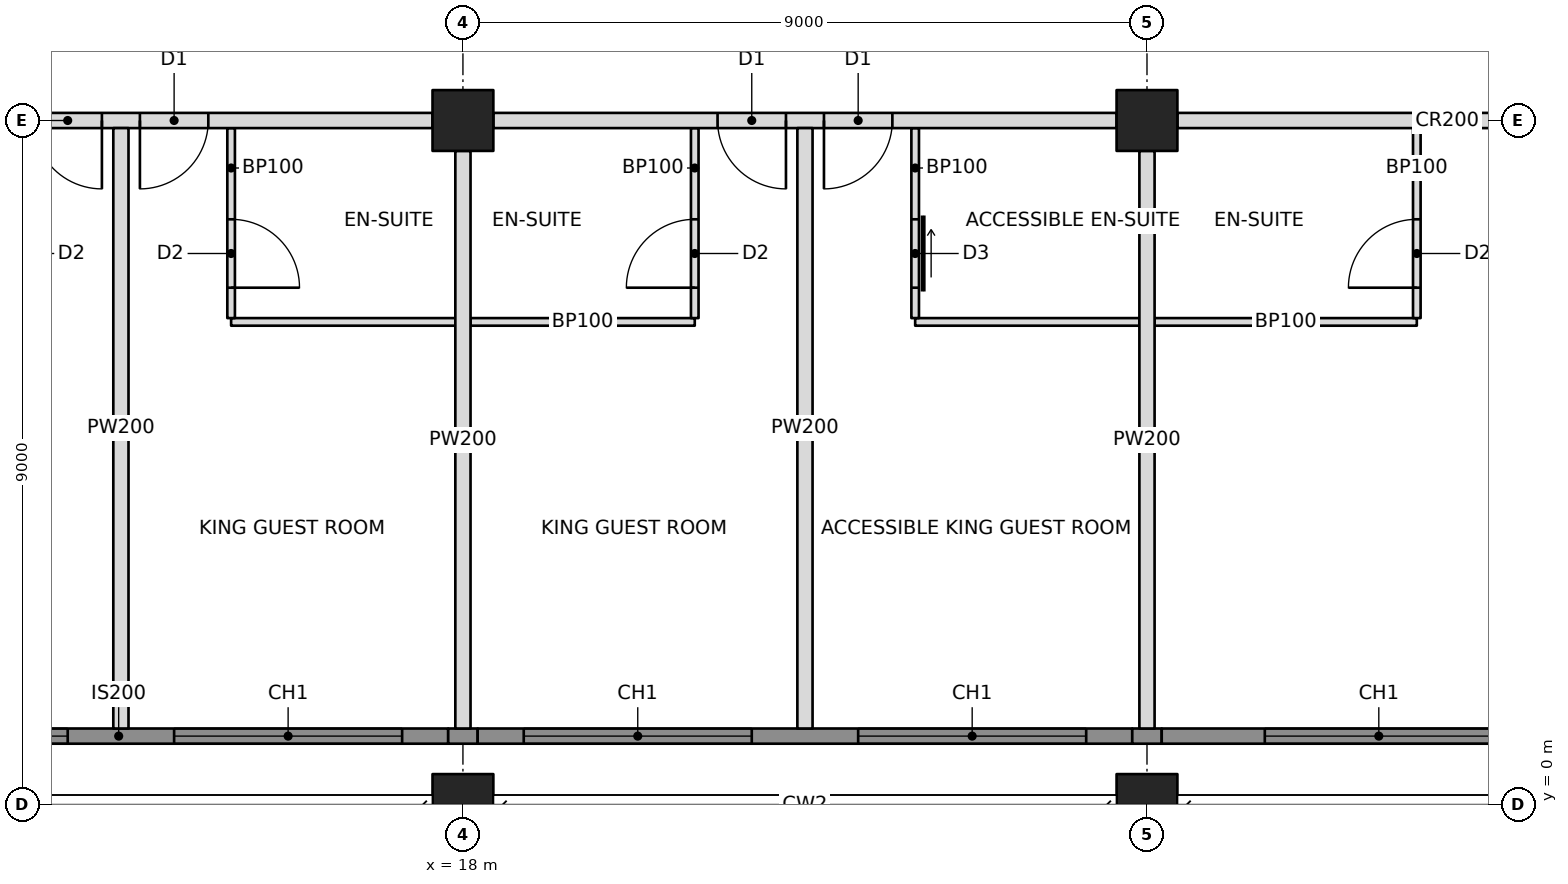
"""IFC4 building model, lengths in metres.
Left out: names, types, materials, properties, quantities, classifications, styles, units other than length and angle.
Written with IfcOpenShell. Run it as: python <this file> out.ifc"""

import sys

from ifc_helpers import new_model, si_unit, direction, frame, frame_2d, origin, origin_2d, place, context, subcontext, project, spatial, rectangle, hollow_rectangle, extrude, element, fill, save


model = new_model("IFC4")
c1 = context("Model", 3, precision=1e-05, world=origin(), true_north=direction((0.0, 1.0)))
c2 = subcontext(c1, "Body", "Model", "MODEL_VIEW")
j1 = project(units=[si_unit("LENGTHUNIT", "METRE"), si_unit("PLANEANGLEUNIT", "RADIAN")], contexts=[c1])
p1 = place(None, origin())
s1 = spatial("IfcSite", under=j1, at=p1, CompositionType="ELEMENT")
p2 = place(p1, origin())
s2 = spatial("IfcBuilding", under=s1, at=p2, CompositionType="ELEMENT")
p3 = place(p2, frame((0.0, 0.0, 251.8)))
s3 = spatial("IfcBuildingStorey", under=s2, at=p3, CompositionType="ELEMENT", Elevation=251.8)
for number, where, z_axis, x_axis in (
    (1, (18.0, 0.0, 0.0), (0.0, 0.0, 1.0), (1.0, 0.0, 0.0)),
    (2, (18.0, 9.0, 0.0), (0.0, 0.0, 1.0), (1.0, 0.0, 0.0)),
    (3, (27.0, 0.0, 0.0), (0.0, 0.0, 1.0), (1.0, 0.0, 0.0)),
    (4, (27.0, 9.0, 0.0), (0.0, 0.0, 1.0), (1.0, 0.0, 0.0)),
):
    element("IfcColumn", number, at=place(p3, frame(where, z_axis=z_axis, x_axis=x_axis)), inside=s3, PredefinedType="COLUMN", context=c2, shape_type="SweptSolid", body=[
        extrude(hollow_rectangle(XDim=0.8, YDim=0.8, WallThickness=0.032, at=origin_2d()), origin(), (0.0, 0.0, 1.0), 3.6),
    ])
p4 = place(p3, frame((9.4, 9.0, 0.0), z_axis=(0.0, 0.0, 1.0), x_axis=(1.0, 0.0, 0.0)))
e5 = element("IfcWall", 5, at=p4, inside=s3, PredefinedType="PARTITIONING", context=c2, shape_type="SweptSolid", body=[
    extrude(rectangle(XDim=8.2, YDim=0.2, at=frame_2d((4.1, 0.0))), origin(), (0.0, 0.0, 1.0), 2.605),
])
p5 = place(p4, frame((2.95, 0.0, 0.0)))
e6 = element("IfcOpeningElement", 6, at=p5, cuts=e5, PredefinedType="OPENING", context=c2, shape_type="SweptSolid", body=[
    extrude(rectangle(XDim=0.9, YDim=2.1, at=frame_2d((0.45, 1.05))), frame((0.0, 0.11, 0.0), z_axis=(0.0, -1.0, 0.0), x_axis=(1.0, 0.0, 0.0)), (0.0, 0.0, 1.0), 0.22),
])
p6 = place(p4, frame((4.35, 0.0, 0.0)))
e7 = element("IfcOpeningElement", 7, at=p6, cuts=e5, PredefinedType="OPENING", context=c2, shape_type="SweptSolid", body=[
    extrude(rectangle(XDim=0.9, YDim=2.1, at=frame_2d((0.45, 1.05))), frame((0.0, 0.11, 0.0), z_axis=(0.0, -1.0, 0.0), x_axis=(1.0, 0.0, 0.0)), (0.0, 0.0, 1.0), 0.22),
])
p7 = place(p3, frame((18.4, 9.0, 0.0), z_axis=(0.0, 0.0, 1.0), x_axis=(1.0, 0.0, 0.0)))
e8 = element("IfcWall", 8, at=p7, inside=s3, PredefinedType="PARTITIONING", context=c2, shape_type="SweptSolid", body=[
    extrude(rectangle(XDim=8.2, YDim=0.2, at=frame_2d((4.1, 0.0))), origin(), (0.0, 0.0, 1.0), 2.605),
])
p8 = place(p7, frame((2.95, 0.0, 0.0)))
e9 = element("IfcOpeningElement", 9, at=p8, cuts=e8, PredefinedType="OPENING", context=c2, shape_type="SweptSolid", body=[
    extrude(rectangle(XDim=0.9, YDim=2.1, at=frame_2d((0.45, 1.05))), frame((0.0, 0.11, 0.0), z_axis=(0.0, -1.0, 0.0), x_axis=(1.0, 0.0, 0.0)), (0.0, 0.0, 1.0), 0.22),
])
p9 = place(p7, frame((4.35, 0.0, 0.0)))
e10 = element("IfcOpeningElement", 10, at=p9, cuts=e8, PredefinedType="OPENING", context=c2, shape_type="SweptSolid", body=[
    extrude(rectangle(XDim=0.9, YDim=2.1, at=frame_2d((0.45, 1.05))), frame((0.0, 0.11, 0.0), z_axis=(0.0, -1.0, 0.0), x_axis=(1.0, 0.0, 0.0)), (0.0, 0.0, 1.0), 0.22),
])
p10 = place(p3, frame((27.4, 9.0, 0.0), z_axis=(0.0, 0.0, 1.0), x_axis=(1.0, 0.0, 0.0)))
e11 = element("IfcWall", 11, at=p10, inside=s3, PredefinedType="PARTITIONING", context=c2, shape_type="SweptSolid", body=[
    extrude(rectangle(XDim=8.378, YDim=0.2, at=frame_2d((4.189, 0.0))), origin(), (0.0, 0.0, 1.0), 2.605),
])
p11 = place(p10, frame((7.25, 0.0, 0.0)))
e12 = element("IfcOpeningElement", 12, at=p11, cuts=e11, PredefinedType="OPENING", context=c2, shape_type="SweptSolid", body=[
    extrude(rectangle(XDim=0.9, YDim=2.1, at=frame_2d((0.45, 1.05))), frame((0.0, 0.11, 0.0), z_axis=(0.0, -1.0, 0.0), x_axis=(1.0, 0.0, 0.0)), (0.0, 0.0, 1.0), 0.22),
])
p12 = place(p3, frame((13.5, 8.9, 0.0), z_axis=(0.0, 0.0, 1.0), x_axis=(0.0, -1.0, 0.0)))
e13 = element("IfcWall", 13, at=p12, inside=s3, PredefinedType="PARTITIONING", context=c2, shape_type="SweptSolid", body=[
    extrude(rectangle(XDim=7.9, YDim=0.2, at=frame_2d((3.95, 0.0))), origin(), (0.0, 0.0, 1.0), 2.604),
])
p13 = place(p3, frame((18.0, 8.6, 0.0), z_axis=(0.0, 0.0, 1.0), x_axis=(0.0, -1.0, 0.0)))
e14 = element("IfcWall", 14, at=p13, inside=s3, PredefinedType="PARTITIONING", context=c2, shape_type="SweptSolid", body=[
    extrude(rectangle(XDim=7.6, YDim=0.2, at=frame_2d((3.8, 0.0))), origin(), (0.0, 0.0, 1.0), 2.605),
])
p14 = place(p3, frame((22.5, 8.9, 0.0), z_axis=(0.0, 0.0, 1.0), x_axis=(0.0, -1.0, 0.0)))
e15 = element("IfcWall", 15, at=p14, inside=s3, PredefinedType="PARTITIONING", context=c2, shape_type="SweptSolid", body=[
    extrude(rectangle(XDim=7.9, YDim=0.2, at=frame_2d((3.95, 0.0))), origin(), (0.0, 0.0, 1.0), 2.604),
])
p15 = place(p3, frame((27.0, 8.6, 0.0), z_axis=(0.0, 0.0, 1.0), x_axis=(0.0, -1.0, 0.0)))
e16 = element("IfcWall", 16, at=p15, inside=s3, PredefinedType="PARTITIONING", context=c2, shape_type="SweptSolid", body=[
    extrude(rectangle(XDim=7.6, YDim=0.2, at=frame_2d((3.8, 0.0))), origin(), (0.0, 0.0, 1.0), 2.605),
])
p16 = place(p3, frame((14.95, 6.35, 0.0), z_axis=(0.0, 0.0, 1.0), x_axis=(1.0, 0.0, 0.0)))
e17 = element("IfcWall", 17, at=p16, inside=s3, PredefinedType="PARTITIONING", context=c2, shape_type="SweptSolid", body=[
    extrude(rectangle(XDim=2.95, YDim=0.1, at=frame_2d((1.475, 0.0))), origin(), (0.0, 0.0, 1.0), 2.604),
])
p17 = place(p3, frame((14.95, 8.9, 0.0), z_axis=(0.0, 0.0, 1.0), x_axis=(0.0, -1.0, 0.0)))
e18 = element("IfcWall", 18, at=p17, inside=s3, PredefinedType="PARTITIONING", context=c2, shape_type="SweptSolid", body=[
    extrude(rectangle(XDim=2.5, YDim=0.1, at=frame_2d((1.25, 0.0))), origin(), (0.0, 0.0, 1.0), 2.604),
])
p18 = place(p17, frame((1.2, 0.0, 0.0)))
e19 = element("IfcOpeningElement", 19, at=p18, cuts=e18, PredefinedType="OPENING", context=c2, shape_type="SweptSolid", body=[
    extrude(rectangle(XDim=0.9, YDim=2.1, at=frame_2d((0.45, 1.05))), frame((0.0, 0.06, 0.0), z_axis=(0.0, -1.0, 0.0), x_axis=(1.0, 0.0, 0.0)), (0.0, 0.0, 1.0), 0.12),
])
p19 = place(p3, frame((18.1, 6.35, 0.0), z_axis=(0.0, 0.0, 1.0), x_axis=(1.0, 0.0, 0.0)))
e20 = element("IfcWall", 20, at=p19, inside=s3, PredefinedType="PARTITIONING", context=c2, shape_type="SweptSolid", body=[
    extrude(rectangle(XDim=2.95, YDim=0.1, at=frame_2d((1.475, 0.0))), origin(), (0.0, 0.0, 1.0), 2.604),
])
p20 = place(p3, frame((21.05, 8.9, 0.0), z_axis=(0.0, 0.0, 1.0), x_axis=(0.0, -1.0, 0.0)))
e21 = element("IfcWall", 21, at=p20, inside=s3, PredefinedType="PARTITIONING", context=c2, shape_type="SweptSolid", body=[
    extrude(rectangle(XDim=2.5, YDim=0.1, at=frame_2d((1.25, 0.0))), origin(), (0.0, 0.0, 1.0), 2.604),
])
p21 = place(p20, frame((1.2, 0.0, 0.0)))
e22 = element("IfcOpeningElement", 22, at=p21, cuts=e21, PredefinedType="OPENING", context=c2, shape_type="SweptSolid", body=[
    extrude(rectangle(XDim=0.9, YDim=2.1, at=frame_2d((0.45, 1.05))), frame((0.0, 0.06, 0.0), z_axis=(0.0, -1.0, 0.0), x_axis=(1.0, 0.0, 0.0)), (0.0, 0.0, 1.0), 0.12),
])
p22 = place(p3, frame((23.95, 6.35, 0.0), z_axis=(0.0, 0.0, 1.0), x_axis=(1.0, 0.0, 0.0)))
e23 = element("IfcWall", 23, at=p22, inside=s3, PredefinedType="PARTITIONING", context=c2, shape_type="SweptSolid", body=[
    extrude(rectangle(XDim=2.95, YDim=0.1, at=frame_2d((1.475, 0.0))), origin(), (0.0, 0.0, 1.0), 2.604),
])
p23 = place(p3, frame((23.95, 8.9, 0.0), z_axis=(0.0, 0.0, 1.0), x_axis=(0.0, -1.0, 0.0)))
e24 = element("IfcWall", 24, at=p23, inside=s3, PredefinedType="PARTITIONING", context=c2, shape_type="SweptSolid", body=[
    extrude(rectangle(XDim=2.5, YDim=0.1, at=frame_2d((1.25, 0.0))), origin(), (0.0, 0.0, 1.0), 2.604),
])
p24 = place(p23, frame((1.2, 0.0, 0.0)))
e25 = element("IfcOpeningElement", 25, at=p24, cuts=e24, PredefinedType="OPENING", context=c2, shape_type="SweptSolid", body=[
    extrude(rectangle(XDim=0.9, YDim=2.1, at=frame_2d((0.45, 1.05))), frame((0.0, 0.06, 0.0), z_axis=(0.0, -1.0, 0.0), x_axis=(1.0, 0.0, 0.0)), (0.0, 0.0, 1.0), 0.12),
])
p25 = place(p3, frame((27.1, 6.35, 0.0), z_axis=(0.0, 0.0, 1.0), x_axis=(1.0, 0.0, 0.0)))
e26 = element("IfcWall", 26, at=p25, inside=s3, PredefinedType="PARTITIONING", context=c2, shape_type="SweptSolid", body=[
    extrude(rectangle(XDim=3.45, YDim=0.1, at=frame_2d((1.725, 0.0))), origin(), (0.0, 0.0, 1.0), 2.604),
])
p26 = place(p3, frame((30.55, 8.9, 0.0), z_axis=(0.0, 0.0, 1.0), x_axis=(0.0, -1.0, 0.0)))
e27 = element("IfcWall", 27, at=p26, inside=s3, PredefinedType="PARTITIONING", context=c2, shape_type="SweptSolid", body=[
    extrude(rectangle(XDim=2.5, YDim=0.1, at=frame_2d((1.25, 0.0))), origin(), (0.0, 0.0, 1.0), 2.604),
])
p27 = place(p26, frame((1.2, 0.0, 0.0)))
e28 = element("IfcOpeningElement", 28, at=p27, cuts=e27, PredefinedType="OPENING", context=c2, shape_type="SweptSolid", body=[
    extrude(rectangle(XDim=0.9, YDim=2.1, at=frame_2d((0.45, 1.05))), frame((0.0, 0.06, 0.0), z_axis=(0.0, -1.0, 0.0), x_axis=(1.0, 0.0, 0.0)), (0.0, 0.0, 1.0), 0.12),
])
p28 = place(p3, frame((9.135, 0.9, 0.0), z_axis=(0.0, 0.0, 1.0), x_axis=(1.0, 0.0, 0.0)))
e29 = element("IfcWall", 29, at=p28, inside=s3, PredefinedType="SOLIDWALL", context=c2, shape_type="SweptSolid", body=[
    extrude(rectangle(XDim=8.671, YDim=0.2, at=frame_2d((4.335, 0.0))), origin(), (0.0, 0.0, 1.0), 3.4),
])
p29 = place(p28, frame((0.665, 0.0, 0.6)))
e30 = element("IfcOpeningElement", 30, at=p29, cuts=e29, PredefinedType="OPENING", context=c2, shape_type="SweptSolid", body=[
    extrude(rectangle(XDim=3.0, YDim=2.2, at=frame_2d((1.5, 1.1))), frame((0.0, 0.11, 0.0), z_axis=(0.0, -1.0, 0.0), x_axis=(1.0, 0.0, 0.0)), (0.0, 0.0, 1.0), 0.22),
])
p30 = place(p28, frame((5.065, 0.0, 0.6)))
e31 = element("IfcOpeningElement", 31, at=p30, cuts=e29, PredefinedType="OPENING", context=c2, shape_type="SweptSolid", body=[
    extrude(rectangle(XDim=3.0, YDim=2.2, at=frame_2d((1.5, 1.1))), frame((0.0, 0.11, 0.0), z_axis=(0.0, -1.0, 0.0), x_axis=(1.0, 0.0, 0.0)), (0.0, 0.0, 1.0), 0.22),
])
p31 = place(p3, frame((17.806, 0.9, 0.0), z_axis=(0.0, 0.0, 1.0), x_axis=(1.0, 0.0, 0.0)))
e32 = element("IfcWall", 32, at=p31, inside=s3, PredefinedType="SOLIDWALL", context=c2, shape_type="SweptSolid", body=[
    extrude(rectangle(XDim=0.388, YDim=0.2, at=frame_2d((0.194, 0.0))), origin(), (0.0, 0.0, 1.0), 2.604),
])
p32 = place(p3, frame((18.194, 0.9, 0.0), z_axis=(0.0, 0.0, 1.0), x_axis=(1.0, 0.0, 0.0)))
e33 = element("IfcWall", 33, at=p32, inside=s3, PredefinedType="SOLIDWALL", context=c2, shape_type="SweptSolid", body=[
    extrude(rectangle(XDim=8.612, YDim=0.2, at=frame_2d((4.306, 0.0))), origin(), (0.0, 0.0, 1.0), 3.4),
])
p33 = place(p32, frame((0.606, 0.0, 0.6)))
e34 = element("IfcOpeningElement", 34, at=p33, cuts=e33, PredefinedType="OPENING", context=c2, shape_type="SweptSolid", body=[
    extrude(rectangle(XDim=3.0, YDim=2.2, at=frame_2d((1.5, 1.1))), frame((0.0, 0.11, 0.0), z_axis=(0.0, -1.0, 0.0), x_axis=(1.0, 0.0, 0.0)), (0.0, 0.0, 1.0), 0.22),
])
p34 = place(p32, frame((5.006, 0.0, 0.6)))
e35 = element("IfcOpeningElement", 35, at=p34, cuts=e33, PredefinedType="OPENING", context=c2, shape_type="SweptSolid", body=[
    extrude(rectangle(XDim=3.0, YDim=2.2, at=frame_2d((1.5, 1.1))), frame((0.0, 0.11, 0.0), z_axis=(0.0, -1.0, 0.0), x_axis=(1.0, 0.0, 0.0)), (0.0, 0.0, 1.0), 0.22),
])
p35 = place(p3, frame((26.806, 0.9, 0.0), z_axis=(0.0, 0.0, 1.0), x_axis=(1.0, 0.0, 0.0)))
e36 = element("IfcWall", 36, at=p35, inside=s3, PredefinedType="SOLIDWALL", context=c2, shape_type="SweptSolid", body=[
    extrude(rectangle(XDim=0.388, YDim=0.2, at=frame_2d((0.194, 0.0))), origin(), (0.0, 0.0, 1.0), 2.604),
])
p36 = place(p3, frame((27.194, 0.9, 0.0), z_axis=(0.0, 0.0, 1.0), x_axis=(1.0, 0.0, 0.0)))
e37 = element("IfcWall", 37, at=p36, inside=s3, PredefinedType="SOLIDWALL", context=c2, shape_type="SweptSolid", body=[
    extrude(rectangle(XDim=5.806, YDim=0.2, at=frame_2d((2.903, 0.0))), origin(), (0.0, 0.0, 1.0), 3.4),
])
p37 = place(p36, frame((1.356, 0.0, 0.6)))
e38 = element("IfcOpeningElement", 38, at=p37, cuts=e37, PredefinedType="OPENING", context=c2, shape_type="SweptSolid", body=[
    extrude(rectangle(XDim=3.0, YDim=2.2, at=frame_2d((1.5, 1.1))), frame((0.0, 0.11, 0.0), z_axis=(0.0, -1.0, 0.0), x_axis=(1.0, 0.0, 0.0)), (0.0, 0.0, 1.0), 0.22),
])
p38 = place(p29, origin())
e39 = element("IfcWindow", 39, at=p38, inside=s3, PartitioningType="TRIPLE_PANEL_VERTICAL", PredefinedType="WINDOW", context=c2, shape_type="SweptSolid", body=[
    extrude(rectangle(XDim=3.0, YDim=2.2, at=frame_2d((1.5, 1.1))), frame((0.0, 0.03, 0.0), z_axis=(0.0, -1.0, 0.0), x_axis=(1.0, 0.0, 0.0)), (0.0, 0.0, 1.0), 0.06),
])
fill(e30, e39)
p39 = place(p30, origin())
e40 = element("IfcWindow", 40, at=p39, inside=s3, PartitioningType="TRIPLE_PANEL_VERTICAL", PredefinedType="WINDOW", context=c2, shape_type="SweptSolid", body=[
    extrude(rectangle(XDim=3.0, YDim=2.2, at=frame_2d((1.5, 1.1))), frame((0.0, 0.03, 0.0), z_axis=(0.0, -1.0, 0.0), x_axis=(1.0, 0.0, 0.0)), (0.0, 0.0, 1.0), 0.06),
])
fill(e31, e40)
p40 = place(p33, origin())
e41 = element("IfcWindow", 41, at=p40, inside=s3, PartitioningType="TRIPLE_PANEL_VERTICAL", PredefinedType="WINDOW", context=c2, shape_type="SweptSolid", body=[
    extrude(rectangle(XDim=3.0, YDim=2.2, at=frame_2d((1.5, 1.1))), frame((0.0, 0.03, 0.0), z_axis=(0.0, -1.0, 0.0), x_axis=(1.0, 0.0, 0.0)), (0.0, 0.0, 1.0), 0.06),
])
fill(e34, e41)
p41 = place(p34, origin())
e42 = element("IfcWindow", 42, at=p41, inside=s3, PartitioningType="TRIPLE_PANEL_VERTICAL", PredefinedType="WINDOW", context=c2, shape_type="SweptSolid", body=[
    extrude(rectangle(XDim=3.0, YDim=2.2, at=frame_2d((1.5, 1.1))), frame((0.0, 0.03, 0.0), z_axis=(0.0, -1.0, 0.0), x_axis=(1.0, 0.0, 0.0)), (0.0, 0.0, 1.0), 0.06),
])
fill(e35, e42)
p42 = place(p37, origin())
e43 = element("IfcWindow", 43, at=p42, inside=s3, PartitioningType="TRIPLE_PANEL_VERTICAL", PredefinedType="WINDOW", context=c2, shape_type="SweptSolid", body=[
    extrude(rectangle(XDim=3.0, YDim=2.2, at=frame_2d((1.5, 1.1))), frame((0.0, 0.03, 0.0), z_axis=(0.0, -1.0, 0.0), x_axis=(1.0, 0.0, 0.0)), (0.0, 0.0, 1.0), 0.06),
])
fill(e38, e43)
p43 = place(p5, frame((0.9, 0.0, 0.0), z_axis=(0.0, 0.0, 1.0), x_axis=(-1.0, 0.0, 0.0)))
e44 = element("IfcDoor", 44, at=p43, inside=s3, OperationType="SINGLE_SWING_LEFT", PredefinedType="DOOR", context=c2, shape_type="SweptSolid", body=[
    extrude(rectangle(XDim=0.9, YDim=2.1, at=frame_2d((0.45, 1.05))), frame((0.0, 0.025, 0.0), z_axis=(0.0, -1.0, 0.0), x_axis=(1.0, 0.0, 0.0)), (0.0, 0.0, 1.0), 0.05),
])
fill(e6, e44)
p44 = place(p18, origin())
e45 = element("IfcDoor", 45, at=p44, inside=s3, OperationType="SINGLE_SWING_RIGHT", PredefinedType="DOOR", context=c2, shape_type="SweptSolid", body=[
    extrude(rectangle(XDim=0.9, YDim=2.1, at=frame_2d((0.45, 1.05))), frame((0.0, 0.025, 0.0), z_axis=(0.0, -1.0, 0.0), x_axis=(1.0, 0.0, 0.0)), (0.0, 0.0, 1.0), 0.05),
])
fill(e19, e45)
p45 = place(p6, frame((0.9, 0.0, 0.0), z_axis=(0.0, 0.0, 1.0), x_axis=(-1.0, 0.0, 0.0)))
e46 = element("IfcDoor", 46, at=p45, inside=s3, OperationType="SINGLE_SWING_RIGHT", PredefinedType="DOOR", context=c2, shape_type="SweptSolid", body=[
    extrude(rectangle(XDim=0.9, YDim=2.1, at=frame_2d((0.45, 1.05))), frame((0.0, 0.025, 0.0), z_axis=(0.0, -1.0, 0.0), x_axis=(1.0, 0.0, 0.0)), (0.0, 0.0, 1.0), 0.05),
])
fill(e7, e46)
p46 = place(p21, frame((0.9, 0.0, 0.0), z_axis=(0.0, 0.0, 1.0), x_axis=(-1.0, 0.0, 0.0)))
e47 = element("IfcDoor", 47, at=p46, inside=s3, OperationType="SINGLE_SWING_LEFT", PredefinedType="DOOR", context=c2, shape_type="SweptSolid", body=[
    extrude(rectangle(XDim=0.9, YDim=2.1, at=frame_2d((0.45, 1.05))), frame((0.0, 0.025, 0.0), z_axis=(0.0, -1.0, 0.0), x_axis=(1.0, 0.0, 0.0)), (0.0, 0.0, 1.0), 0.05),
])
fill(e22, e47)
p47 = place(p8, frame((0.9, 0.0, 0.0), z_axis=(0.0, 0.0, 1.0), x_axis=(-1.0, 0.0, 0.0)))
e48 = element("IfcDoor", 48, at=p47, inside=s3, OperationType="SINGLE_SWING_LEFT", PredefinedType="DOOR", context=c2, shape_type="SweptSolid", body=[
    extrude(rectangle(XDim=0.9, YDim=2.1, at=frame_2d((0.45, 1.05))), frame((0.0, 0.025, 0.0), z_axis=(0.0, -1.0, 0.0), x_axis=(1.0, 0.0, 0.0)), (0.0, 0.0, 1.0), 0.05),
])
fill(e9, e48)
p48 = place(p24, origin())
e49 = element("IfcDoor", 49, at=p48, inside=s3, OperationType="SLIDING_TO_LEFT", PredefinedType="DOOR", context=c2, shape_type="SweptSolid", body=[
    extrude(rectangle(XDim=0.9, YDim=2.1, at=frame_2d((0.45, 1.05))), frame((0.0, 0.025, 0.0), z_axis=(0.0, -1.0, 0.0), x_axis=(1.0, 0.0, 0.0)), (0.0, 0.0, 1.0), 0.05),
])
fill(e25, e49)
p49 = place(p9, frame((0.9, 0.0, 0.0), z_axis=(0.0, 0.0, 1.0), x_axis=(-1.0, 0.0, 0.0)))
e50 = element("IfcDoor", 50, at=p49, inside=s3, OperationType="SINGLE_SWING_RIGHT", PredefinedType="DOOR", context=c2, shape_type="SweptSolid", body=[
    extrude(rectangle(XDim=0.9, YDim=2.1, at=frame_2d((0.45, 1.05))), frame((0.0, 0.025, 0.0), z_axis=(0.0, -1.0, 0.0), x_axis=(1.0, 0.0, 0.0)), (0.0, 0.0, 1.0), 0.05),
])
fill(e10, e50)
p50 = place(p27, frame((0.9, 0.0, 0.0), z_axis=(0.0, 0.0, 1.0), x_axis=(-1.0, 0.0, 0.0)))
e51 = element("IfcDoor", 51, at=p50, inside=s3, OperationType="SINGLE_SWING_LEFT", PredefinedType="DOOR", context=c2, shape_type="SweptSolid", body=[
    extrude(rectangle(XDim=0.9, YDim=2.1, at=frame_2d((0.45, 1.05))), frame((0.0, 0.025, 0.0), z_axis=(0.0, -1.0, 0.0), x_axis=(1.0, 0.0, 0.0)), (0.0, 0.0, 1.0), 0.05),
])
fill(e28, e51)
save(model, sys.argv[1])
